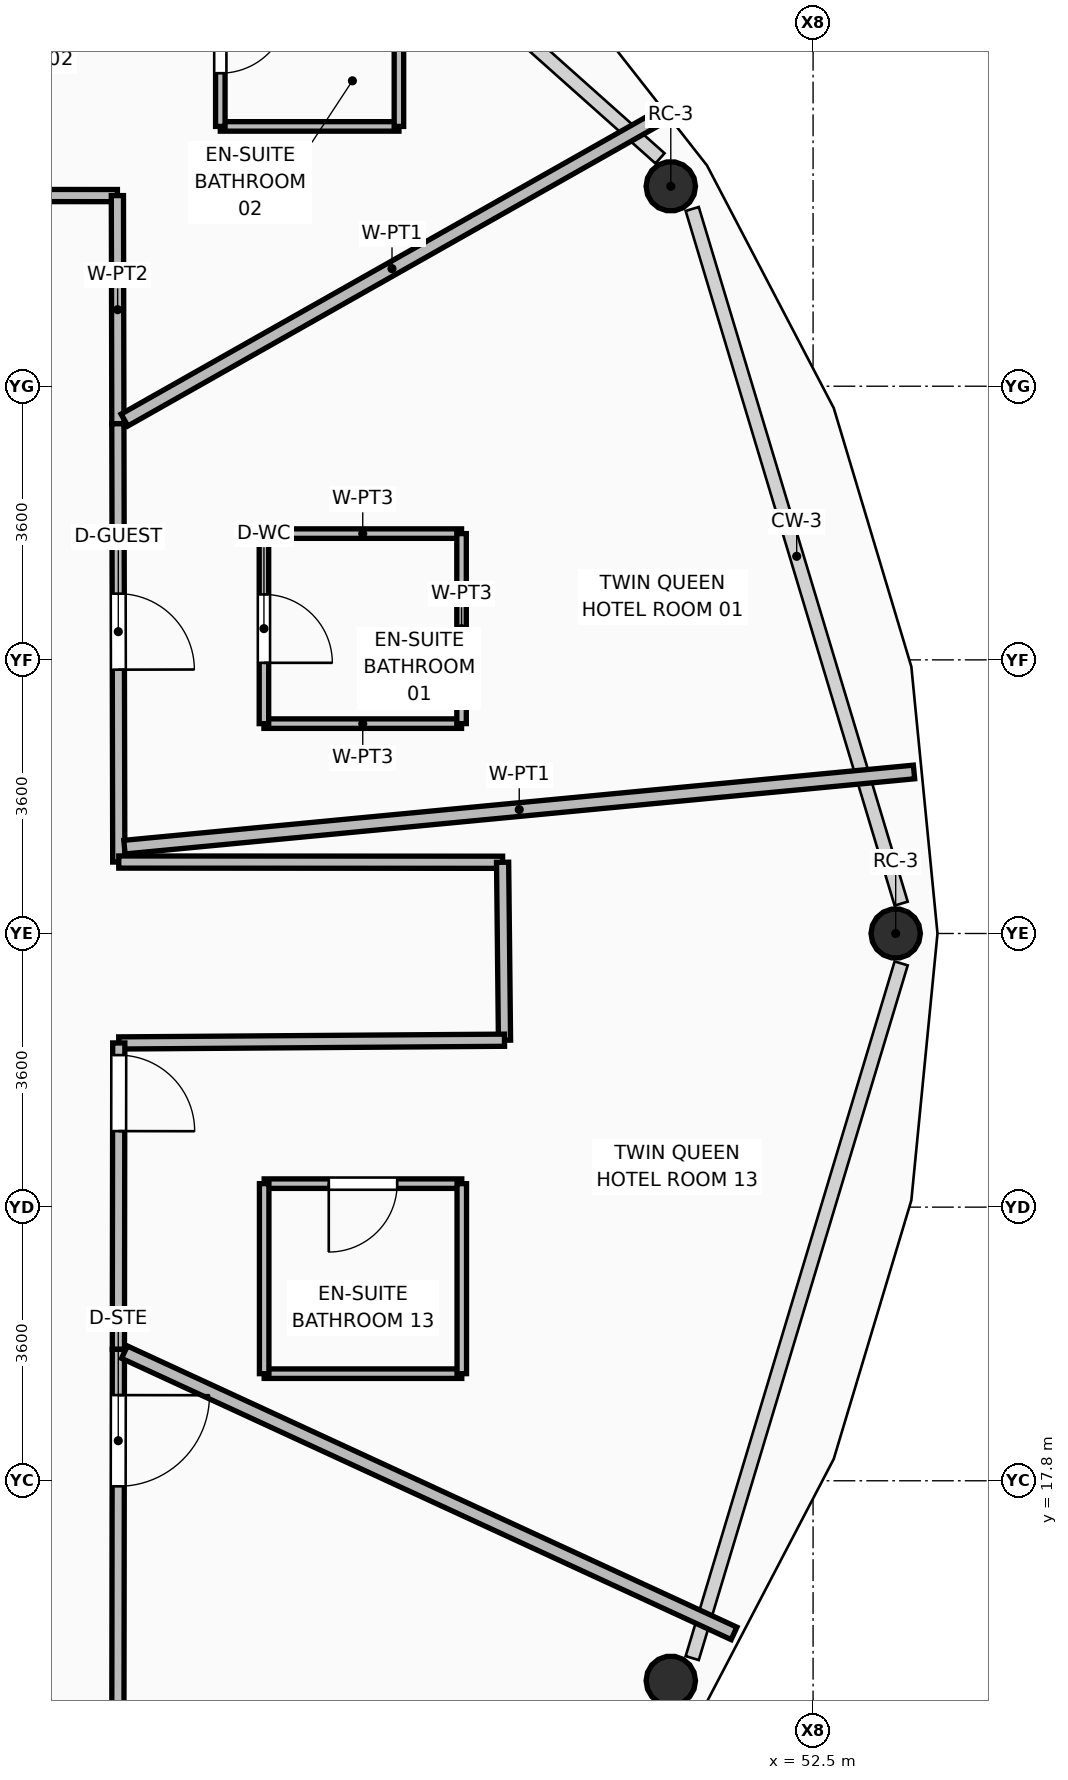
"""IFC4 building model, lengths in metres.
Left out: names, types, materials, properties, quantities, classifications, styles, units other than length and angle.
Written with IfcOpenShell. Run it as: python <this file> out.ifc"""

import sys

from ifc_helpers import new_model, si_unit, direction, frame, frame_2d, origin, origin_2d, place, context, subcontext, project, spatial, rectangle, hollow_circle, extrude, element, fill, save


model = new_model("IFC4")
c1 = context("Model", 3, precision=1e-05, world=origin(), true_north=direction((0.0, 1.0)))
c2 = subcontext(c1, "Body", "Model", "MODEL_VIEW")
j1 = project(units=[si_unit("LENGTHUNIT", "METRE"), si_unit("PLANEANGLEUNIT", "RADIAN")], contexts=[c1])
p1 = place(None, origin())
s1 = spatial("IfcSite", under=j1, at=p1, CompositionType="ELEMENT")
p2 = place(p1, origin())
s2 = spatial("IfcBuilding", under=s1, at=p2, CompositionType="ELEMENT")
p3 = place(p2, frame((0.0, 0.0, 216.15)))
s3 = spatial("IfcBuildingStorey", under=s2, at=p3, CompositionType="ELEMENT", Elevation=216.15)
for number, where, z_axis, x_axis in (
    (1, (53.587, 25.0, 0.0), (-0.021, 0.0, 1.0), (0.0, -1.0, 0.0)),
    (2, (50.628, 34.83, 0.0), (-0.018, -0.009, 1.0), (0.447, -0.894, 0.0)),
    (3, (50.628, 15.169, 0.0), (-0.018, 0.009, 1.0), (-0.458, -0.889, 0.0)),
):
    element("IfcColumn", number, at=place(p3, frame(where, z_axis=z_axis, x_axis=x_axis)), inside=s3, PredefinedType="COLUMN", context=c2, shape_type="SweptSolid", body=[
        extrude(hollow_circle(Radius=0.325, WallThickness=0.03, at=origin_2d()), origin(), (0.0, 0.0, 1.0), 3.571),
    ])
p4 = place(p3, frame((38.203, 34.712, 0.0), z_axis=(0.0, 0.0, 1.0), x_axis=(0.999999711676, -0.000759373298, 0.0)))
e4 = element("IfcWall", 4, at=p4, inside=s3, PredefinedType="PARTITIONING", context=c2, shape_type="SweptSolid", body=[
    extrude(rectangle(XDim=5.144, YDim=0.16, at=frame_2d((2.572, 0.0))), origin(), (0.0, 0.0, 1.0), 3.081),
])
p5 = place(p4, frame((0.601, 0.0, 0.0)))
e5 = element("IfcOpeningElement", 5, at=p5, cuts=e4, PredefinedType="OPENING", context=c2, shape_type="SweptSolid", body=[
    extrude(rectangle(XDim=1.0, YDim=2.1, at=frame_2d((0.5, 1.05))), frame((0.0, 0.09, 0.0), z_axis=(0.0, -1.0, 0.0), x_axis=(1.0, 0.0, 0.0)), (0.0, 0.0, 1.0), 0.18),
])
p6 = place(p3, frame((43.347, 34.708, 0.0), z_axis=(0.0, 0.0, 1.0), x_axis=(0.00203317732, -0.999997933093, 0.0)))
e6 = element("IfcWall", 6, at=p6, inside=s3, PredefinedType="PARTITIONING", context=c2, shape_type="SweptSolid", body=[
    extrude(rectangle(XDim=3.002, YDim=0.16, at=frame_2d((1.501, 0.0))), origin(), (0.0, 0.0, 1.0), 3.081),
])
p7 = place(p3, frame((43.353, 31.706, 0.0), z_axis=(0.0, 0.0, 1.0), x_axis=(0.002074684332, -0.99999784784, 0.0)))
e7 = element("IfcWall", 7, at=p7, inside=s3, PredefinedType="PARTITIONING", context=c2, shape_type="SweptSolid", body=[
    extrude(rectangle(XDim=5.766, YDim=0.16, at=frame_2d((2.883, 0.0))), origin(), (0.0, 0.0, 1.0), 3.55),
])
p8 = place(p7, frame((2.235, 0.0, 0.0)))
e8 = element("IfcOpeningElement", 8, at=p8, cuts=e7, PredefinedType="OPENING", context=c2, shape_type="SweptSolid", body=[
    extrude(rectangle(XDim=1.0, YDim=2.1, at=frame_2d((0.5, 1.05))), frame((0.0, 0.09, 0.0), z_axis=(0.0, -1.0, 0.0), x_axis=(1.0, 0.0, 0.0)), (0.0, 0.0, 1.0), 0.18),
])
p9 = place(p3, frame((43.365, 25.94, 0.0), z_axis=(0.0, 0.0, 1.0), x_axis=(0.999999831724, -0.000580130432, 0.0)))
e9 = element("IfcWall", 9, at=p9, inside=s3, PredefinedType="PARTITIONING", context=c2, shape_type="SweptSolid", body=[
    extrude(rectangle(XDim=5.05, YDim=0.16, at=frame_2d((2.525, 0.0))), origin(), (0.0, 0.0, 1.0), 3.55),
])
p10 = place(p3, frame((48.415, 25.937, 0.0), z_axis=(0.0, 0.0, 1.0), x_axis=(0.010636586698, -0.999943429912, 0.0)))
e10 = element("IfcWall", 10, at=p10, inside=s3, PredefinedType="PARTITIONING", context=c2, shape_type="SweptSolid", body=[
    extrude(rectangle(XDim=2.341, YDim=0.16, at=frame_2d((1.171, 0.0))), origin(), (0.0, 0.0, 1.0), 3.55),
])
p11 = place(p3, frame((48.44, 23.596, 0.0), z_axis=(0.0, 0.0, 1.0), x_axis=(-0.999974996273, -0.007071550702, 0.0)))
e11 = element("IfcWall", 11, at=p11, inside=s3, PredefinedType="PARTITIONING", context=c2, shape_type="SweptSolid", body=[
    extrude(rectangle(XDim=5.075, YDim=0.16, at=frame_2d((2.538, 0.0))), origin(), (0.0, 0.0, 1.0), 3.55),
])
p12 = place(p3, frame((43.365, 23.56, 0.0), z_axis=(0.0, 0.0, 1.0), x_axis=(-0.001211312781, -0.99999926636, 0.0)))
e12 = element("IfcWall", 12, at=p12, inside=s3, PredefinedType="PARTITIONING", context=c2, shape_type="SweptSolid", body=[
    extrude(rectangle(XDim=4.031, YDim=0.16, at=frame_2d((2.016, 0.0))), origin(), (0.0, 0.0, 1.0), 3.081),
])
p13 = place(p12, frame((0.16, 0.0, 0.0)))
e13 = element("IfcOpeningElement", 13, at=p13, cuts=e12, PredefinedType="OPENING", context=c2, shape_type="SweptSolid", body=[
    extrude(rectangle(XDim=1.0, YDim=2.1, at=frame_2d((0.5, 1.05))), frame((0.0, 0.09, 0.0), z_axis=(0.0, -1.0, 0.0), x_axis=(1.0, 0.0, 0.0)), (0.0, 0.0, 1.0), 0.18),
])
p14 = place(p3, frame((43.36, 19.529, 0.0), z_axis=(0.0, 0.0, 1.0), x_axis=(-0.001376854092, -0.999999052136, 0.0)))
e14 = element("IfcWall", 14, at=p14, inside=s3, PredefinedType="PARTITIONING", context=c2, shape_type="SweptSolid", body=[
    extrude(rectangle(XDim=7.27, YDim=0.16, at=frame_2d((3.635, 0.0))), origin(), (0.0, 0.0, 1.0), 3.081),
])
p15 = place(p14, frame((0.602, 0.0, 0.0)))
e15 = element("IfcOpeningElement", 15, at=p15, cuts=e14, PredefinedType="OPENING", context=c2, shape_type="SweptSolid", body=[
    extrude(rectangle(XDim=1.2, YDim=2.1, at=frame_2d((0.6, 1.05))), frame((0.0, 0.09, 0.0), z_axis=(0.0, -1.0, 0.0), x_axis=(1.0, 0.0, 0.0)), (0.0, 0.0, 1.0), 0.18),
])
p16 = place(p3, frame((43.44, 26.136, 0.0), z_axis=(0.0, 0.0, 1.0), x_axis=(0.995498311275, 0.094779281745, 0.0)))
e16 = element("IfcWall", 16, at=p16, inside=s3, PredefinedType="PARTITIONING", context=c2, shape_type="SweptSolid", body=[
    extrude(rectangle(XDim=10.435, YDim=0.18, at=frame_2d((5.217, 0.0))), origin(), (0.0, 0.0, 1.0), 2.925),
])
p17 = place(p3, frame((43.44, 31.755, 0.0), z_axis=(0.0, 0.0, 1.0), x_axis=(0.870350829843, 0.492432160802, 0.0)))
e17 = element("IfcWall", 17, at=p17, inside=s3, PredefinedType="PARTITIONING", context=c2, shape_type="SweptSolid", body=[
    extrude(rectangle(XDim=8.089, YDim=0.18, at=frame_2d((4.044, 0.0))), origin(), (0.0, 0.0, 1.0), 2.925),
])
p18 = place(p3, frame((38.257, 34.79, 0.0), z_axis=(0.0, 0.0, 1.0), x_axis=(0.56802823634, 0.823009066001, 0.0)))
e18 = element("IfcWall", 18, at=p18, inside=s3, PredefinedType="PARTITIONING", context=c2, shape_type="SweptSolid", body=[
    extrude(rectangle(XDim=8.867, YDim=0.18, at=frame_2d((4.434, 0.0))), origin(), (0.0, 0.0, 1.0), 2.925),
])
p19 = place(p3, frame((43.44, 19.492, 0.0), z_axis=(0.0, 0.0, 1.0), x_axis=(0.908028139302, -0.418909176594, 0.0)))
e19 = element("IfcWall", 19, at=p19, inside=s3, PredefinedType="PARTITIONING", context=c2, shape_type="SweptSolid", body=[
    extrude(rectangle(XDim=8.832, YDim=0.18, at=frame_2d((4.416, 0.0))), origin(), (0.0, 0.0, 1.0), 2.925),
])
for number, where, z_axis, x_axis in (
    (20, (45.275, 27.761, 0.0), (0.0, 0.0, 1.0), (1.0, 0.0, 0.0)),
    (21, (45.275, 30.261, 0.0), (0.0, 0.0, 1.0), (1.0, 0.0, 0.0)),
):
    element("IfcWall", number, at=place(p3, frame(where, z_axis=z_axis, x_axis=x_axis)), inside=s3, PredefinedType="PARTITIONING", context=c2, shape_type="SweptSolid", body=[
        extrude(rectangle(XDim=2.6, YDim=0.125, at=frame_2d((1.3, 0.0))), origin(), (0.0, 0.0, 1.0), 3.55),
    ])
p20 = place(p3, frame((45.275, 27.761, 0.0), z_axis=(0.0, 0.0, 1.0), x_axis=(0.0, 1.0, 0.0)))
e22 = element("IfcWall", 22, at=p20, inside=s3, PredefinedType="PARTITIONING", context=c2, shape_type="SweptSolid", body=[
    extrude(rectangle(XDim=2.5, YDim=0.125, at=frame_2d((1.25, 0.0))), origin(), (0.0, 0.0, 1.0), 3.55),
])
p21 = place(p20, frame((0.8, 0.0, 0.0)))
e23 = element("IfcOpeningElement", 23, at=p21, cuts=e22, PredefinedType="OPENING", context=c2, shape_type="SweptSolid", body=[
    extrude(rectangle(XDim=0.9, YDim=2.1, at=frame_2d((0.45, 1.05))), frame((0.0, 0.073, 0.0), z_axis=(0.0, -1.0, 0.0), x_axis=(1.0, 0.0, 0.0)), (0.0, 0.0, 1.0), 0.145),
])
p22 = place(p3, frame((47.875, 27.761, 0.0), z_axis=(0.0, 0.0, 1.0), x_axis=(0.0, 1.0, 0.0)))
e24 = element("IfcWall", 24, at=p22, inside=s3, PredefinedType="PARTITIONING", context=c2, shape_type="SweptSolid", body=[
    extrude(rectangle(XDim=2.5, YDim=0.125, at=frame_2d((1.25, 0.0))), origin(), (0.0, 0.0, 1.0), 3.55),
])
p23 = place(p3, frame((44.701, 35.618, 0.0), z_axis=(0.0, 0.0, 1.0), x_axis=(1.0, 0.0, 0.0)))
e25 = element("IfcWall", 25, at=p23, inside=s3, PredefinedType="PARTITIONING", context=c2, shape_type="SweptSolid", body=[
    extrude(rectangle(XDim=2.35, YDim=0.125, at=frame_2d((1.175, 0.0))), origin(), (0.0, 0.0, 1.0), 3.55),
])
p24 = place(p3, frame((44.701, 35.618, 0.0), z_axis=(0.0, 0.0, 1.0), x_axis=(0.0, 1.0, 0.0)))
e26 = element("IfcWall", 26, at=p24, inside=s3, PredefinedType="PARTITIONING", context=c2, shape_type="SweptSolid", body=[
    extrude(rectangle(XDim=2.3, YDim=0.125, at=frame_2d((1.15, 0.0))), origin(), (0.0, 0.0, 1.0), 3.55),
])
p25 = place(p24, frame((0.7, 0.0, 0.0)))
e27 = element("IfcOpeningElement", 27, at=p25, cuts=e26, PredefinedType="OPENING", context=c2, shape_type="SweptSolid", body=[
    extrude(rectangle(XDim=0.9, YDim=2.1, at=frame_2d((0.45, 1.05))), frame((0.0, 0.073, 0.0), z_axis=(0.0, -1.0, 0.0), x_axis=(1.0, 0.0, 0.0)), (0.0, 0.0, 1.0), 0.145),
])
p26 = place(p3, frame((47.051, 35.618, 0.0), z_axis=(0.0, 0.0, 1.0), x_axis=(0.0, 1.0, 0.0)))
e28 = element("IfcWall", 28, at=p26, inside=s3, PredefinedType="PARTITIONING", context=c2, shape_type="SweptSolid", body=[
    extrude(rectangle(XDim=2.3, YDim=0.125, at=frame_2d((1.15, 0.0))), origin(), (0.0, 0.0, 1.0), 2.925),
])
p27 = place(p3, frame((45.278, 19.209, 0.0), z_axis=(0.0, 0.0, 1.0), x_axis=(1.0, 0.0, 0.0)))
e29 = element("IfcWall", 29, at=p27, inside=s3, PredefinedType="PARTITIONING", context=c2, shape_type="SweptSolid", body=[
    extrude(rectangle(XDim=2.6, YDim=0.125, at=frame_2d((1.3, 0.0))), origin(), (0.0, 0.0, 1.0), 3.55),
])
p28 = place(p3, frame((45.278, 21.709, 0.0), z_axis=(0.0, 0.0, 1.0), x_axis=(1.0, 0.0, 0.0)))
e30 = element("IfcWall", 30, at=p28, inside=s3, PredefinedType="PARTITIONING", context=c2, shape_type="SweptSolid", body=[
    extrude(rectangle(XDim=2.6, YDim=0.125, at=frame_2d((1.3, 0.0))), origin(), (0.0, 0.0, 1.0), 3.081),
])
p29 = place(p28, frame((0.85, 0.0, 0.0)))
e31 = element("IfcOpeningElement", 31, at=p29, cuts=e30, PredefinedType="OPENING", context=c2, shape_type="SweptSolid", body=[
    extrude(rectangle(XDim=0.9, YDim=2.1, at=frame_2d((0.45, 1.05))), frame((0.0, 0.073, 0.0), z_axis=(0.0, -1.0, 0.0), x_axis=(1.0, 0.0, 0.0)), (0.0, 0.0, 1.0), 0.145),
])
p30 = place(p3, frame((45.278, 19.209, 0.0), z_axis=(0.0, 0.0, 1.0), x_axis=(0.0, 1.0, 0.0)))
e32 = element("IfcWall", 32, at=p30, inside=s3, PredefinedType="PARTITIONING", context=c2, shape_type="SweptSolid", body=[
    extrude(rectangle(XDim=2.5, YDim=0.125, at=frame_2d((1.25, 0.0))), origin(), (0.0, 0.0, 1.0), 3.081),
])
p31 = place(p3, frame((47.878, 19.209, 0.0), z_axis=(0.0, 0.0, 1.0), x_axis=(0.0, 1.0, 0.0)))
e33 = element("IfcWall", 33, at=p31, inside=s3, PredefinedType="PARTITIONING", context=c2, shape_type="SweptSolid", body=[
    extrude(rectangle(XDim=2.5, YDim=0.125, at=frame_2d((1.25, 0.0))), origin(), (0.0, 0.0, 1.0), 3.55),
])
p32 = place(p21, frame((0.9, 0.0, 0.0), z_axis=(0.0, 0.0, 1.0), x_axis=(-1.0, 0.0, 0.0)))
e34 = element("IfcDoor", 34, at=p32, inside=s3, OperationType="SINGLE_SWING_RIGHT", PredefinedType="DOOR", context=c2, shape_type="SweptSolid", body=[
    extrude(rectangle(XDim=0.9, YDim=2.1, at=frame_2d((0.45, 1.05))), frame((0.0, 0.025, 0.0), z_axis=(0.0, -1.0, 0.0), x_axis=(1.0, 0.0, 0.0)), (0.0, 0.0, 1.0), 0.05),
])
fill(e23, e34)
p33 = place(p8, origin())
e35 = element("IfcDoor", 35, at=p33, inside=s3, OperationType="SINGLE_SWING_RIGHT", PredefinedType="DOOR", context=c2, shape_type="SweptSolid", body=[
    extrude(rectangle(XDim=1.0, YDim=2.1, at=frame_2d((0.5, 1.05))), frame((0.0, 0.025, 0.0), z_axis=(0.0, -1.0, 0.0), x_axis=(1.0, 0.0, 0.0)), (0.0, 0.0, 1.0), 0.05),
])
fill(e8, e35)
p34 = place(p25, frame((0.9, 0.0, 0.0), z_axis=(0.0, 0.0, 1.0), x_axis=(-1.0, 0.0, 0.0)))
e36 = element("IfcDoor", 36, at=p34, inside=s3, OperationType="SINGLE_SWING_LEFT", PredefinedType="DOOR", context=c2, shape_type="SweptSolid", body=[
    extrude(rectangle(XDim=0.9, YDim=2.1, at=frame_2d((0.45, 1.05))), frame((0.0, 0.025, 0.0), z_axis=(0.0, -1.0, 0.0), x_axis=(1.0, 0.0, 0.0)), (0.0, 0.0, 1.0), 0.05),
])
fill(e27, e36)
p35 = place(p15, origin())
e37 = element("IfcDoor", 37, at=p35, inside=s3, OperationType="SINGLE_SWING_LEFT", PredefinedType="DOOR", context=c2, shape_type="SweptSolid", body=[
    extrude(rectangle(XDim=1.2, YDim=2.1, at=frame_2d((0.6, 1.05))), frame((0.0, 0.025, 0.0), z_axis=(0.0, -1.0, 0.0), x_axis=(1.0, 0.0, 0.0)), (0.0, 0.0, 1.0), 0.05),
])
fill(e15, e37)
p36 = place(p29, frame((0.9, 0.0, 0.0), z_axis=(0.0, 0.0, 1.0), x_axis=(-1.0, 0.0, 0.0)))
e38 = element("IfcDoor", 38, at=p36, inside=s3, OperationType="SINGLE_SWING_RIGHT", PredefinedType="DOOR", context=c2, shape_type="SweptSolid", body=[
    extrude(rectangle(XDim=0.9, YDim=2.1, at=frame_2d((0.45, 1.05))), frame((0.0, 0.025, 0.0), z_axis=(0.0, -1.0, 0.0), x_axis=(1.0, 0.0, 0.0)), (0.0, 0.0, 1.0), 0.05),
])
fill(e31, e38)
p37 = place(p13, origin())
e39 = element("IfcDoor", 39, at=p37, inside=s3, OperationType="SINGLE_SWING_RIGHT", PredefinedType="DOOR", context=c2, shape_type="SweptSolid", body=[
    extrude(rectangle(XDim=1.0, YDim=2.1, at=frame_2d((0.5, 1.05))), frame((0.0, 0.025, 0.0), z_axis=(0.0, -1.0, 0.0), x_axis=(1.0, 0.0, 0.0)), (0.0, 0.0, 1.0), 0.05),
])
fill(e13, e39)
save(model, sys.argv[1])
